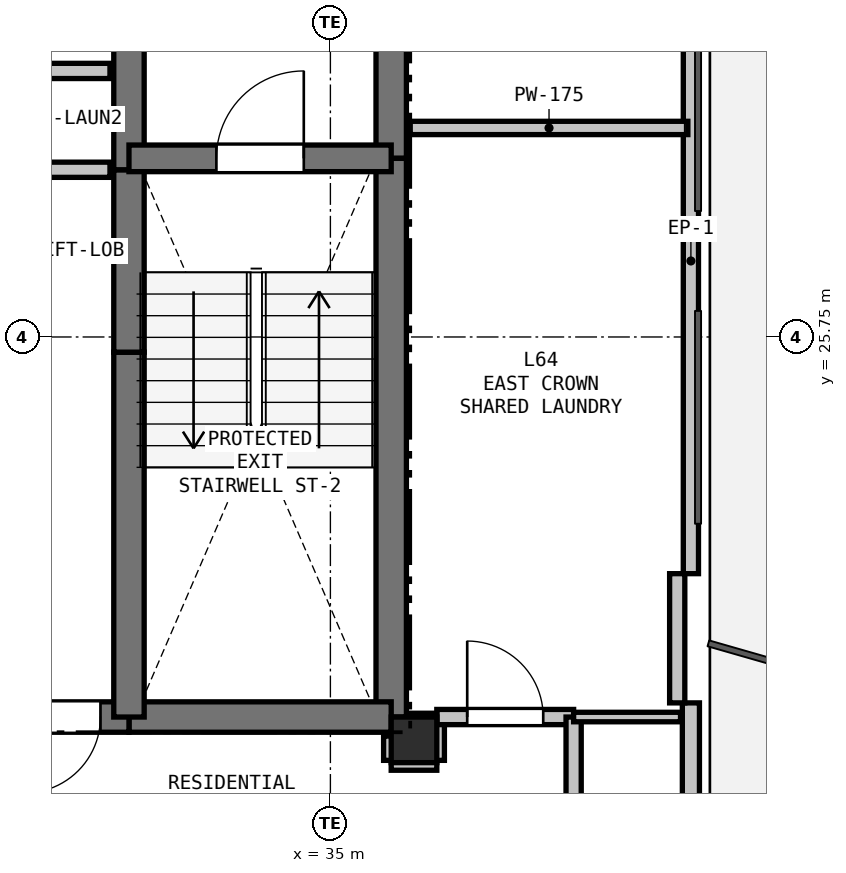
"""IFC4 building model, lengths in metres.
Left out: names, types, materials, properties, quantities, classifications, styles, units other than length and angle.
Written with IfcOpenShell. Run it as: python <this file> out.ifc"""

import sys

from ifc_helpers import new_model, si_unit, direction, frame, frame_2d, origin, origin_2d, place, context, subcontext, project, spatial, rectangle, extrude, element, fill, save


model = new_model("IFC4")
c1 = context("Model", 3, precision=1e-05, world=origin(), true_north=direction((0.0, 1.0)))
c2 = subcontext(c1, "Body", "Model", "MODEL_VIEW")
j1 = project(units=[si_unit("LENGTHUNIT", "METRE"), si_unit("PLANEANGLEUNIT", "RADIAN")], contexts=[c1])
p1 = place(None, origin())
s1 = spatial("IfcSite", under=j1, at=p1, CompositionType="ELEMENT")
p2 = place(p1, origin())
s2 = spatial("IfcBuilding", under=s1, at=p2, CompositionType="ELEMENT")
p3 = place(p2, frame((0.0, 0.0, 229.8)))
s3 = spatial("IfcBuildingStorey", under=s2, at=p3, CompositionType="ELEMENT", Elevation=229.8)
p4 = place(p3, frame((36.1, 20.45, 0.0), z_axis=(0.0, 0.0, 1.0), x_axis=(1.0, 0.0, 0.0)))
e1 = element("IfcColumn", 1, at=p4, inside=s3, PredefinedType="COLUMN", context=c2, shape_type="SweptSolid", body=[
    extrude(rectangle(XDim=0.6, YDim=0.6, at=origin_2d()), origin(), (0.0, 0.0, 1.0), 3.3),
])
p5 = place(p3, frame((39.743, 30.864, 0.0), z_axis=(0.0, 0.0, 1.0), x_axis=(0.0, -1.0, 0.0)))
e2 = element("IfcWall", 2, at=p5, inside=s3, PredefinedType="PARAPET", context=c2, shape_type="SweptSolid", body=[
    extrude(rectangle(XDim=8.228, YDim=0.2, at=frame_2d((4.114, 0.0))), origin(), (0.0, 0.0, 1.0), 0.2),
])
p6 = place(p3, frame((39.743, 20.936, 0.0), z_axis=(0.0, 0.0, 1.0), x_axis=(0.0, -1.0, 0.0)))
e3 = element("IfcWall", 3, at=p6, inside=s3, PredefinedType="SOLIDWALL", context=c2, shape_type="SweptSolid", body=[
    extrude(rectangle(XDim=8.928, YDim=0.225, at=frame_2d((4.464, 0.0))), origin(), (0.0, 0.0, 1.0), 2.7),
])
p7 = place(p6, frame((6.322, 0.0, 0.9)))
e4 = element("IfcOpeningElement", 4, at=p7, cuts=e3, PredefinedType="OPENING", context=c2, shape_type="SweptSolid", body=[
    extrude(rectangle(XDim=1.2, YDim=1.4, at=frame_2d((0.6, 0.7))), frame((0.0, 0.123, 0.0), z_axis=(0.0, -1.0, 0.0), x_axis=(1.0, 0.0, 0.0)), (0.0, 0.0, 1.0), 0.245),
])
p8 = place(p3, frame((39.563, 22.636, 0.0), z_axis=(0.0, 0.0, 1.0), x_axis=(0.0, -1.0, 0.0)))
e5 = element("IfcWall", 5, at=p8, inside=s3, PredefinedType="PARAPET", context=c2, shape_type="SweptSolid", body=[
    extrude(rectangle(XDim=1.7, YDim=0.2, at=frame_2d((0.85, 0.0))), origin(), (0.0, 0.0, 1.0), 2.7),
])
p9 = place(p3, frame((35.8, 32.75, 0.0), z_axis=(0.0, 0.0, 1.0), x_axis=(0.0, -1.0, 0.0)))
e6 = element("IfcWall", 6, at=p9, inside=s3, PredefinedType="SHEAR", context=c2, shape_type="SweptSolid", body=[
    extrude(rectangle(XDim=4.65, YDim=0.4, at=frame_2d((2.325, 0.0))), origin(), (0.0, 0.0, 1.0), 3.08),
])
p10 = place(p3, frame((35.8, 28.1, 0.0), z_axis=(0.0, 0.0, 1.0), x_axis=(0.0, -1.0, 0.0)))
e7 = element("IfcWall", 7, at=p10, inside=s3, PredefinedType="SHEAR", context=c2, shape_type="SweptSolid", body=[
    extrude(rectangle(XDim=7.35, YDim=0.4, at=frame_2d((3.675, 0.0))), origin(), (0.0, 0.0, 1.0), 3.08),
])
p11 = place(p3, frame((35.8, 20.75, 0.0), z_axis=(0.0, 0.0, 1.0), x_axis=(-1.0, 0.0, 0.0)))
e8 = element("IfcWall", 8, at=p11, inside=s3, PredefinedType="SHEAR", context=c2, shape_type="SweptSolid", body=[
    extrude(rectangle(XDim=3.45, YDim=0.4, at=frame_2d((1.725, 0.0))), origin(), (0.0, 0.0, 1.0), 3.08),
])
p12 = place(p3, frame((32.35, 20.75, 0.0), z_axis=(0.0, 0.0, 1.0), x_axis=(-1.0, 0.0, 0.0)))
e9 = element("IfcWall", 9, at=p12, inside=s3, PredefinedType="SHEAR", context=c2, shape_type="SweptSolid", body=[
    extrude(rectangle(XDim=1.75, YDim=0.4, at=frame_2d((0.875, 0.0))), origin(), (0.0, 0.0, 1.0), 3.08),
])
p13 = place(p12, frame((0.375, 0.0, 0.0)))
e10 = element("IfcOpeningElement", 10, at=p13, cuts=e9, PredefinedType="OPENING", context=c2, shape_type="SweptSolid", body=[
    extrude(rectangle(XDim=1.0, YDim=2.15, at=frame_2d((0.5, 1.075))), frame((0.0, 0.21, 0.0), z_axis=(0.0, -1.0, 0.0), x_axis=(1.0, 0.0, 0.0)), (0.0, 0.0, 1.0), 0.42),
])
p14 = place(p3, frame((32.35, 20.75, 0.0), z_axis=(0.0, 0.0, 1.0), x_axis=(0.0, 1.0, 0.0)))
e11 = element("IfcWall", 11, at=p14, inside=s3, PredefinedType="SHEAR", context=c2, shape_type="SweptSolid", body=[
    extrude(rectangle(XDim=4.8, YDim=0.4, at=frame_2d((2.4, 0.0))), origin(), (0.0, 0.0, 1.0), 3.08),
])
p15 = place(p3, frame((32.35, 25.55, 0.0), z_axis=(0.0, 0.0, 1.0), x_axis=(0.0, 1.0, 0.0)))
e12 = element("IfcWall", 12, at=p15, inside=s3, PredefinedType="SHEAR", context=c2, shape_type="SweptSolid", body=[
    extrude(rectangle(XDim=2.4, YDim=0.4, at=frame_2d((1.2, 0.0))), origin(), (0.0, 0.0, 1.0), 3.08),
])
p16 = place(p3, frame((32.35, 27.95, 0.0), z_axis=(0.0, 0.0, 1.0), x_axis=(0.0, 1.0, 0.0)))
e13 = element("IfcWall", 13, at=p16, inside=s3, PredefinedType="SHEAR", context=c2, shape_type="SweptSolid", body=[
    extrude(rectangle(XDim=2.8, YDim=0.4, at=frame_2d((1.4, 0.0))), origin(), (0.0, 0.0, 1.0), 3.08),
])
p17 = place(p3, frame((32.35, 28.1, 0.0), z_axis=(0.0, 0.0, 1.0), x_axis=(1.0, 0.0, 0.0)))
e14 = element("IfcWall", 14, at=p17, inside=s3, PredefinedType="SHEAR", context=c2, shape_type="SweptSolid", body=[
    extrude(rectangle(XDim=3.45, YDim=0.35, at=frame_2d((1.725, 0.0))), origin(), (0.0, 0.0, 1.0), 3.08),
])
p18 = place(p17, frame((1.15, 0.0, 0.0)))
e15 = element("IfcOpeningElement", 15, at=p18, cuts=e14, PredefinedType="OPENING", context=c2, shape_type="SweptSolid", body=[
    extrude(rectangle(XDim=1.15, YDim=2.15, at=frame_2d((0.575, 1.075))), frame((0.0, 0.185, 0.0), z_axis=(0.0, -1.0, 0.0), x_axis=(1.0, 0.0, 0.0)), (0.0, 0.0, 1.0), 0.37),
])
p19 = place(p3, frame((27.4, 27.95, 0.0), z_axis=(0.0, 0.0, 1.0), x_axis=(1.0, 0.0, 0.0)))
e16 = element("IfcWall", 16, at=p19, inside=s3, PredefinedType="PARTITIONING", context=c2, shape_type="SweptSolid", body=[
    extrude(rectangle(XDim=4.7, YDim=0.2, at=frame_2d((2.35, 0.0))), origin(), (0.0, 0.0, 1.0), 3.08),
])
p20 = place(p19, frame((1.85, 0.0, 0.0)))
e17 = element("IfcOpeningElement", 17, at=p20, cuts=e16, PredefinedType="OPENING", context=c2, shape_type="SweptSolid", body=[
    extrude(rectangle(XDim=1.0, YDim=2.15, at=frame_2d((0.5, 1.075))), frame((0.0, 0.11, 0.0), z_axis=(0.0, -1.0, 0.0), x_axis=(1.0, 0.0, 0.0)), (0.0, 0.0, 1.0), 0.22),
])
p21 = place(p3, frame((35.8, 20.15, 0.0), z_axis=(0.0, 0.0, 1.0), x_axis=(1.0, 0.0, 0.0)))
e18 = element("IfcWall", 18, at=p21, inside=s3, PredefinedType="PARTITIONING", context=c2, shape_type="SweptSolid", body=[
    extrude(rectangle(XDim=0.6, YDim=0.2, at=frame_2d((0.3, 0.0))), origin(), (0.0, 0.0, 1.0), 2.528),
])
p22 = place(p3, frame((36.4, 20.18, 0.0), z_axis=(0.0, 0.0, 1.0), x_axis=(0.0, 1.0, 0.0)))
e19 = element("IfcWall", 19, at=p22, inside=s3, PredefinedType="PARTITIONING", context=c2, shape_type="SweptSolid", body=[
    extrude(rectangle(XDim=0.57, YDim=0.2, at=frame_2d((0.285, 0.0))), origin(), (0.0, 0.0, 1.0), 3.08),
])
p23 = place(p3, frame((36.4, 20.75, 0.0), z_axis=(0.0, 0.0, 1.0), x_axis=(1.0, 0.0, 0.0)))
e20 = element("IfcWall", 20, at=p23, inside=s3, PredefinedType="PARTITIONING", context=c2, shape_type="SweptSolid", body=[
    extrude(rectangle(XDim=1.8, YDim=0.2, at=frame_2d((0.9, 0.0))), origin(), (0.0, 0.0, 1.0), 3.08),
])
p24 = place(p23, frame((0.4, 0.0, 0.0)))
e21 = element("IfcOpeningElement", 21, at=p24, cuts=e20, PredefinedType="OPENING", context=c2, shape_type="SweptSolid", body=[
    extrude(rectangle(XDim=1.0, YDim=2.15, at=frame_2d((0.5, 1.075))), frame((0.0, 0.11, 0.0), z_axis=(0.0, -1.0, 0.0), x_axis=(1.0, 0.0, 0.0)), (0.0, 0.0, 1.0), 0.22),
])
p25 = place(p3, frame((38.2, 20.75, 0.0), z_axis=(0.0, 0.0, 1.0), x_axis=(0.0, -1.0, 0.0)))
e22 = element("IfcWall", 22, at=p25, inside=s3, PredefinedType="PARTITIONING", context=c2, shape_type="SweptSolid", body=[
    extrude(rectangle(XDim=2.45, YDim=0.2, at=frame_2d((1.225, 0.0))), origin(), (0.0, 0.0, 1.0), 3.08),
])
p26 = place(p3, frame((35.8, 20.5, 0.0), z_axis=(0.0, 0.0, 1.0), x_axis=(0.0, -1.0, 0.0)))
e23 = element("IfcWall", 23, at=p26, inside=s3, PredefinedType="PARTITIONING", context=c2, shape_type="SweptSolid", body=[
    extrude(rectangle(XDim=0.32, YDim=0.2, at=frame_2d((0.16, 0.0))), origin(), (0.0, 0.0, 1.0), 2.605),
])
p27 = place(p3, frame((39.703, 28.5, 0.0), z_axis=(0.0, 0.0, 1.0), x_axis=(-1.0, 0.0, 0.0)))
e24 = element("IfcWall", 24, at=p27, inside=s3, PredefinedType="PLUMBINGWALL", context=c2, shape_type="SweptSolid", body=[
    extrude(rectangle(XDim=3.653, YDim=0.175, at=frame_2d((1.826, 0.0))), origin(), (0.0, 0.0, 1.0), 2.365),
])
p28 = place(p3, frame((32.1, 29.25, 0.0), z_axis=(0.0, 0.0, 1.0), x_axis=(-1.0, 0.0, 0.0)))
e25 = element("IfcWall", 25, at=p28, inside=s3, PredefinedType="PARTITIONING", context=c2, shape_type="SweptSolid", body=[
    extrude(rectangle(XDim=4.7, YDim=0.2, at=frame_2d((2.35, 0.0))), origin(), (0.0, 0.0, 1.0), 3.08),
])
p29 = place(p3, frame((39.606, 20.75, 0.0), z_axis=(0.0, 0.0, 1.0), x_axis=(-1.0, 0.0, 0.0)))
e26 = element("IfcWall", 26, at=p29, inside=s3, PredefinedType="PARTITIONING", context=c2, shape_type="SweptSolid", body=[
    extrude(rectangle(XDim=1.406, YDim=0.125, at=frame_2d((0.703, 0.0))), origin(), (0.0, 0.0, 1.0), 2.365),
])
p30 = place(p3, frame((36.4, 20.75, 0.0), z_axis=(0.0, 0.0, 1.0), x_axis=(-1.0, 0.0, 0.0)))
e27 = element("IfcWall", 27, at=p30, inside=s3, PredefinedType="PARTITIONING", context=c2, shape_type="SweptSolid", body=[
    extrude(rectangle(XDim=0.35, YDim=0.1, at=frame_2d((0.175, 0.0))), origin(), (0.0, 0.0, 1.0), 2.605),
])
p31 = place(p13, origin())
e28 = element("IfcDoor", 28, at=p31, inside=s3, OperationType="SINGLE_SWING_RIGHT", PredefinedType="DOOR", context=c2, shape_type="SweptSolid", body=[
    extrude(rectangle(XDim=1.0, YDim=2.15, at=frame_2d((0.5, 1.075))), frame((0.0, 0.025, 0.0), z_axis=(0.0, -1.0, 0.0), x_axis=(1.0, 0.0, 0.0)), (0.0, 0.0, 1.0), 0.05),
])
fill(e10, e28)
p32 = place(p18, origin())
e29 = element("IfcDoor", 29, at=p32, inside=s3, OperationType="SINGLE_SWING_RIGHT", PredefinedType="DOOR", context=c2, shape_type="SweptSolid", body=[
    extrude(rectangle(XDim=1.15, YDim=2.15, at=frame_2d((0.575, 1.075))), frame((0.0, 0.025, 0.0), z_axis=(0.0, -1.0, 0.0), x_axis=(1.0, 0.0, 0.0)), (0.0, 0.0, 1.0), 0.05),
])
fill(e15, e29)
p33 = place(p24, origin())
e30 = element("IfcDoor", 30, at=p33, inside=s3, OperationType="SINGLE_SWING_LEFT", PredefinedType="DOOR", context=c2, shape_type="SweptSolid", body=[
    extrude(rectangle(XDim=1.0, YDim=2.15, at=frame_2d((0.5, 1.075))), frame((0.0, 0.025, 0.0), z_axis=(0.0, -1.0, 0.0), x_axis=(1.0, 0.0, 0.0)), (0.0, 0.0, 1.0), 0.05),
])
fill(e21, e30)
save(model, sys.argv[1])
